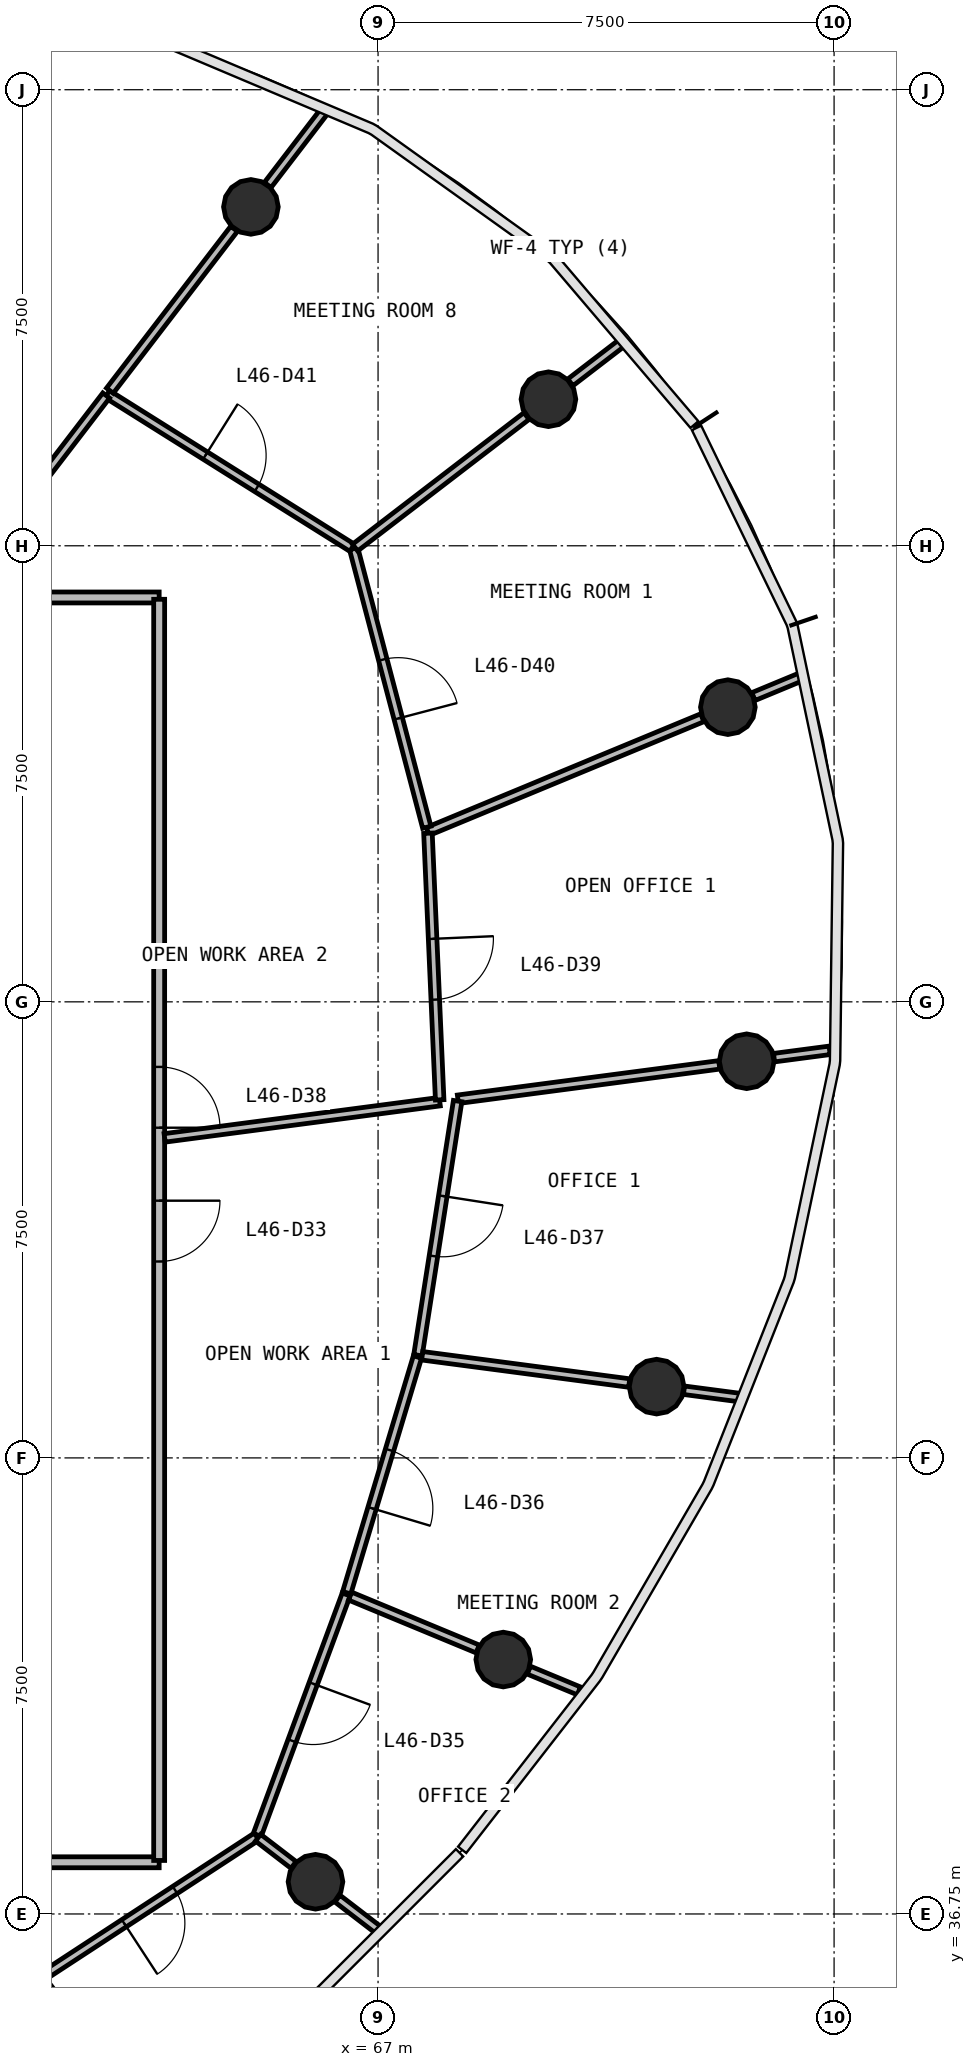
"""IFC4 building model, lengths in metres.
Left out: names, types, materials, properties, quantities, classifications, styles, units other than length and angle.
Written with IfcOpenShell. Run it as: python <this file> out.ifc"""

import sys

from ifc_helpers import new_model, si_unit, direction, frame, frame_2d, origin, origin_2d, place, context, subcontext, project, spatial, rectangle, circle, extrude, source, transform, mapped, element, fill, save


model = new_model("IFC4")
c1 = context("Model", 3, precision=1e-05, world=origin(), true_north=direction((0.0, 1.0)))
c2 = subcontext(c1, "Body", "Model", "MODEL_VIEW")
j1 = project(units=[si_unit("LENGTHUNIT", "METRE"), si_unit("PLANEANGLEUNIT", "RADIAN")], contexts=[c1])
p1 = place(None, origin())
s1 = spatial("IfcSite", under=j1, at=p1, CompositionType="ELEMENT")
p2 = place(p1, origin())
s2 = spatial("IfcBuilding", under=s1, at=p2, CompositionType="ELEMENT")
p3 = place(p2, frame((0.0, 0.0, 191.6)))
s3 = spatial("IfcBuildingStorey", under=s2, at=p3, CompositionType="ELEMENT", Elevation=191.6)
m1 = source(origin(), c2, "Body", "SweptSolid", [
    extrude(circle(Radius=0.45, at=origin_2d()), origin(), (0.0, 0.0, 1.0), 3.9),
])
for number, where, z_axis, x_axis in (
    (1, (73.062, 50.773, 0.0), (0.0, 0.0, 1.0), (1.0, 0.0, 0.0)),
    (2, (72.753, 56.596, 0.0), (0.0, 0.0, 1.0), (1.0, 0.0, 0.0)),
    (3, (69.802, 61.66, 0.0), (0.0, 0.0, 1.0), (1.0, 0.0, 0.0)),
    (4, (64.909, 64.823, 0.0), (0.0, 0.0, 1.0), (1.0, 0.0, 0.0)),
    (5, (65.971, 37.28, 0.0), (0.0, 0.0, 1.0), (1.0, 0.0, 0.0)),
    (6, (69.059, 40.934, 0.0), (0.0, 0.0, 1.0), (1.0, 0.0, 0.0)),
    (7, (71.581, 45.422, 0.0), (0.0, 0.0, 1.0), (1.0, 0.0, 0.0)),
):
    element("IfcColumn", number, at=place(p3, frame(where, z_axis=z_axis, x_axis=x_axis)), inside=s3, PredefinedType="COLUMN", context=c2, shape_type="MappedRepresentation", body=[
        mapped(m1, transform((0.0, 0.0, 0.0), scale=1.0)),
    ])
p4 = place(p3, frame((40.6, 58.4, 0.0), z_axis=(0.0, 0.0, 1.0), x_axis=(1.0, 0.0, 0.0)))
e8 = element("IfcWall", 8, at=p4, inside=s3, PredefinedType="PARTITIONING", context=c2, shape_type="SweptSolid", body=[
    extrude(rectangle(XDim=22.8, YDim=0.18, at=frame_2d((11.4, 0.0))), origin(), (0.0, 0.0, 1.0), 2.88),
])
p5 = place(p4, frame((12.95, 0.0, 0.0)))
e9 = element("IfcOpeningElement", 9, at=p5, cuts=e8, PredefinedType="OPENING", context=c2, shape_type="SweptSolid", body=[
    extrude(rectangle(XDim=1.0, YDim=2.1, at=frame_2d((0.5, 1.05))), frame((0.0, 0.1, 0.0), z_axis=(0.0, -1.0, 0.0), x_axis=(1.0, 0.0, 0.0)), (0.0, 0.0, 1.0), 0.2),
])
p6 = place(p4, frame((10.95, 0.0, 0.0)))
e10 = element("IfcOpeningElement", 10, at=p6, cuts=e8, PredefinedType="OPENING", context=c2, shape_type="SweptSolid", body=[
    extrude(rectangle(XDim=1.0, YDim=2.1, at=frame_2d((0.5, 1.05))), frame((0.0, 0.1, 0.0), z_axis=(0.0, -1.0, 0.0), x_axis=(1.0, 0.0, 0.0)), (0.0, 0.0, 1.0), 0.2),
])
p7 = place(p4, frame((5.75, 0.0, 0.0)))
e11 = element("IfcOpeningElement", 11, at=p7, cuts=e8, PredefinedType="OPENING", context=c2, shape_type="SweptSolid", body=[
    extrude(rectangle(XDim=1.0, YDim=2.1, at=frame_2d((0.5, 1.05))), frame((0.0, 0.1, 0.0), z_axis=(0.0, -1.0, 0.0), x_axis=(1.0, 0.0, 0.0)), (0.0, 0.0, 1.0), 0.2),
])
p8 = place(p3, frame((63.4, 37.6, 0.0), z_axis=(0.0, 0.0, 1.0), x_axis=(-1.0, 0.0, 0.0)))
e12 = element("IfcWall", 12, at=p8, inside=s3, PredefinedType="PARTITIONING", context=c2, shape_type="SweptSolid", body=[
    extrude(rectangle(XDim=22.8, YDim=0.18, at=frame_2d((11.4, 0.0))), origin(), (0.0, 0.0, 1.0), 2.88),
])
p9 = place(p8, frame((10.95, 0.0, 0.0)))
e13 = element("IfcOpeningElement", 13, at=p9, cuts=e12, PredefinedType="OPENING", context=c2, shape_type="SweptSolid", body=[
    extrude(rectangle(XDim=1.0, YDim=2.1, at=frame_2d((0.5, 1.05))), frame((0.0, 0.1, 0.0), z_axis=(0.0, -1.0, 0.0), x_axis=(1.0, 0.0, 0.0)), (0.0, 0.0, 1.0), 0.2),
])
p10 = place(p8, frame((8.75, 0.0, 0.0)))
e14 = element("IfcOpeningElement", 14, at=p10, cuts=e12, PredefinedType="OPENING", context=c2, shape_type="SweptSolid", body=[
    extrude(rectangle(XDim=1.0, YDim=2.1, at=frame_2d((0.5, 1.05))), frame((0.0, 0.1, 0.0), z_axis=(0.0, -1.0, 0.0), x_axis=(1.0, 0.0, 0.0)), (0.0, 0.0, 1.0), 0.2),
])
p11 = place(p3, frame((63.4, 58.37, 0.0), z_axis=(0.0, 0.0, 1.0), x_axis=(0.0, -1.0, 0.0)))
e15 = element("IfcWall", 15, at=p11, inside=s3, PredefinedType="PARTITIONING", context=c2, shape_type="SweptSolid", body=[
    extrude(rectangle(XDim=20.74, YDim=0.18, at=frame_2d((10.37, 0.0))), origin(), (0.0, 0.0, 1.0), 2.88),
])
p12 = place(p11, frame((9.89, 0.0, 0.0)))
e16 = element("IfcOpeningElement", 16, at=p12, cuts=e15, PredefinedType="OPENING", context=c2, shape_type="SweptSolid", body=[
    extrude(rectangle(XDim=1.0, YDim=2.1, at=frame_2d((0.5, 1.05))), frame((0.0, 0.1, 0.0), z_axis=(0.0, -1.0, 0.0), x_axis=(1.0, 0.0, 0.0)), (0.0, 0.0, 1.0), 0.2),
])
p13 = place(p11, frame((7.69, 0.0, 0.0)))
e17 = element("IfcOpeningElement", 17, at=p13, cuts=e15, PredefinedType="OPENING", context=c2, shape_type="SweptSolid", body=[
    extrude(rectangle(XDim=1.0, YDim=2.1, at=frame_2d((0.5, 1.05))), frame((0.0, 0.1, 0.0), z_axis=(0.0, -1.0, 0.0), x_axis=(1.0, 0.0, 0.0)), (0.0, 0.0, 1.0), 0.2),
])
p14 = place(p3, frame((67.82, 54.552, 0.0), z_axis=(0.0, 0.0, 1.0), x_axis=(0.923864546683, 0.382719609353, 0.0)))
e18 = element("IfcWall", 18, at=p14, inside=s3, PredefinedType="PARTITIONING", context=c2, shape_type="SweptSolid", body=[
    extrude(rectangle(XDim=4.885, YDim=0.14, at=frame_2d((2.442, 0.0))), origin(), (0.0, 0.0, 1.0), 2.88),
])
p15 = place(p3, frame((66.599, 59.202, 0.0), z_axis=(0.0, 0.0, 1.0), x_axis=(0.253980714002, -0.967209282893, 0.0)))
e19 = element("IfcWall", 19, at=p15, inside=s3, PredefinedType="PARTITIONING", context=c2, shape_type="SweptSolid", body=[
    extrude(rectangle(XDim=4.736, YDim=0.14, at=frame_2d((2.368, 0.0))), origin(), (0.0, 0.0, 1.0), 2.88),
])
p16 = place(p15, frame((1.886, 0.0, 0.0)))
e20 = element("IfcOpeningElement", 20, at=p16, cuts=e19, PredefinedType="OPENING", context=c2, shape_type="SweptSolid", body=[
    extrude(rectangle(XDim=1.0, YDim=2.1, at=frame_2d((0.5, 1.05))), frame((0.0, 0.08, 0.0), z_axis=(0.0, -1.0, 0.0), x_axis=(1.0, 0.0, 0.0)), (0.0, 0.0, 1.0), 0.16),
])
p17 = place(p3, frame((62.547, 61.745, 0.0), z_axis=(0.0, 0.0, 1.0), x_axis=(0.846992708554, -0.531604506806, 0.0)))
e21 = element("IfcWall", 21, at=p17, inside=s3, PredefinedType="PARTITIONING", context=c2, shape_type="SweptSolid", body=[
    extrude(rectangle(XDim=4.754, YDim=0.14, at=frame_2d((2.377, 0.0))), origin(), (0.0, 0.0, 1.0), 2.88),
])
p18 = place(p17, frame((1.904, 0.0, 0.0)))
e22 = element("IfcOpeningElement", 22, at=p18, cuts=e21, PredefinedType="OPENING", context=c2, shape_type="SweptSolid", body=[
    extrude(rectangle(XDim=1.0, YDim=2.1, at=frame_2d((0.5, 1.05))), frame((0.0, 0.08, 0.0), z_axis=(0.0, -1.0, 0.0), x_axis=(1.0, 0.0, 0.0)), (0.0, 0.0, 1.0), 0.16),
])
p19 = place(p3, frame((63.49, 49.513, 0.0), z_axis=(0.0, 0.0, 1.0), x_axis=(0.991445189432, 0.130523700346, 0.0)))
e23 = element("IfcWall", 23, at=p19, inside=s3, PredefinedType="PARTITIONING", context=c2, shape_type="SweptSolid", body=[
    extrude(rectangle(XDim=4.564, YDim=0.14, at=frame_2d((2.282, 0.0))), origin(), (0.0, 0.0, 1.0), 2.88),
])
p20 = place(p3, frame((67.821, 54.523, 0.0), z_axis=(0.0, 0.0, 1.0), x_axis=(0.043891066245, -0.999036322815, 0.0)))
e24 = element("IfcWall", 24, at=p20, inside=s3, PredefinedType="PARTITIONING", context=c2, shape_type="SweptSolid", body=[
    extrude(rectangle(XDim=4.389, YDim=0.14, at=frame_2d((2.194, 0.0))), origin(), (0.0, 0.0, 1.0), 2.88),
])
p21 = place(p20, frame((1.739, 0.0, 0.0)))
e25 = element("IfcOpeningElement", 25, at=p21, cuts=e24, PredefinedType="OPENING", context=c2, shape_type="SweptSolid", body=[
    extrude(rectangle(XDim=1.0, YDim=2.1, at=frame_2d((0.5, 1.05))), frame((0.0, 0.08, 0.0), z_axis=(0.0, -1.0, 0.0), x_axis=(1.0, 0.0, 0.0)), (0.0, 0.0, 1.0), 0.16),
])
p22 = place(p3, frame((68.313, 50.148, 0.0), z_axis=(0.0, 0.0, 1.0), x_axis=(0.991443942206, 0.130533173806, 0.0)))
e26 = element("IfcWall", 26, at=p22, inside=s3, PredefinedType="PARTITIONING", context=c2, shape_type="SweptSolid", body=[
    extrude(rectangle(XDim=4.335, YDim=0.14, at=frame_2d((2.168, 0.0))), origin(), (0.0, 0.0, 1.0), 2.88),
])
p23 = place(p3, frame((68.309, 50.118, 0.0), z_axis=(0.0, 0.0, 1.0), x_axis=(-0.154216660459, -0.988037054789, 0.0)))
e27 = element("IfcWall", 27, at=p23, inside=s3, PredefinedType="PARTITIONING", context=c2, shape_type="SweptSolid", body=[
    extrude(rectangle(XDim=4.23, YDim=0.14, at=frame_2d((2.115, 0.0))), origin(), (0.0, 0.0, 1.0), 2.88),
])
p24 = place(p23, frame((1.58, 0.0, 0.0)))
e28 = element("IfcOpeningElement", 28, at=p24, cuts=e27, PredefinedType="OPENING", context=c2, shape_type="SweptSolid", body=[
    extrude(rectangle(XDim=1.0, YDim=2.1, at=frame_2d((0.5, 1.05))), frame((0.0, 0.08, 0.0), z_axis=(0.0, -1.0, 0.0), x_axis=(1.0, 0.0, 0.0)), (0.0, 0.0, 1.0), 0.16),
])
p25 = place(p3, frame((65.003, 38.022, 0.0), z_axis=(0.0, 0.0, 1.0), x_axis=(-0.837161645349, -0.546955555376, 0.0)))
e29 = element("IfcWall", 29, at=p25, inside=s3, PredefinedType="PARTITIONING", context=c2, shape_type="SweptSolid", body=[
    extrude(rectangle(XDim=4.254, YDim=0.14, at=frame_2d((2.127, 0.0))), origin(), (0.0, 0.0, 1.0), 2.88),
])
p26 = place(p25, frame((1.604, 0.0, 0.0)))
e30 = element("IfcOpeningElement", 30, at=p26, cuts=e29, PredefinedType="OPENING", context=c2, shape_type="SweptSolid", body=[
    extrude(rectangle(XDim=1.0, YDim=2.1, at=frame_2d((0.5, 1.05))), frame((0.0, 0.08, 0.0), z_axis=(0.0, -1.0, 0.0), x_axis=(1.0, 0.0, 0.0)), (0.0, 0.0, 1.0), 0.16),
])
p27 = place(p3, frame((66.476, 42.004, 0.0), z_axis=(0.0, 0.0, 1.0), x_axis=(-0.346867255576, -0.937914232225, 0.0)))
e31 = element("IfcWall", 31, at=p27, inside=s3, PredefinedType="PARTITIONING", context=c2, shape_type="SweptSolid", body=[
    extrude(rectangle(XDim=4.215, YDim=0.14, at=frame_2d((2.108, 0.0))), origin(), (0.0, 0.0, 1.0), 2.88),
])
p28 = place(p27, frame((1.565, 0.0, 0.0)))
e32 = element("IfcOpeningElement", 32, at=p28, cuts=e31, PredefinedType="OPENING", context=c2, shape_type="SweptSolid", body=[
    extrude(rectangle(XDim=1.0, YDim=2.1, at=frame_2d((0.5, 1.05))), frame((0.0, 0.08, 0.0), z_axis=(0.0, -1.0, 0.0), x_axis=(1.0, 0.0, 0.0)), (0.0, 0.0, 1.0), 0.16),
])
p29 = place(p3, frame((60.049, 58.49, 0.0), z_axis=(0.0, 0.0, 1.0), x_axis=(0.608739821429, 0.793369919903, 0.0)))
e33 = element("IfcWall", 33, at=p29, inside=s3, PredefinedType="PARTITIONING", context=c2, shape_type="SweptSolid", body=[
    extrude(rectangle(XDim=4.073, YDim=0.14, at=frame_2d((2.036, 0.0))), origin(), (0.0, 0.0, 1.0), 2.88),
])
p30 = place(p3, frame((67.648, 45.91, 0.0), z_axis=(0.0, 0.0, 1.0), x_axis=(-0.28737001705, -0.957819645497, 0.0)))
e34 = element("IfcWall", 34, at=p30, inside=s3, PredefinedType="PARTITIONING", context=c2, shape_type="SweptSolid", body=[
    extrude(rectangle(XDim=4.048, YDim=0.14, at=frame_2d((2.024, 0.0))), origin(), (0.0, 0.0, 1.0), 2.88),
])
p31 = place(p30, frame((1.598, 0.0, 0.0)))
e35 = element("IfcOpeningElement", 35, at=p31, cuts=e34, PredefinedType="OPENING", context=c2, shape_type="SweptSolid", body=[
    extrude(rectangle(XDim=1.0, YDim=2.1, at=frame_2d((0.5, 1.05))), frame((0.0, 0.08, 0.0), z_axis=(0.0, -1.0, 0.0), x_axis=(1.0, 0.0, 0.0)), (0.0, 0.0, 1.0), 0.16),
])
p32 = place(p3, frame((66.622, 59.22, 0.0), z_axis=(0.0, 0.0, 1.0), x_axis=(0.793364115727, 0.60874738593, 0.0)))
e36 = element("IfcWall", 36, at=p32, inside=s3, PredefinedType="PARTITIONING", context=c2, shape_type="SweptSolid", body=[
    extrude(rectangle(XDim=3.553, YDim=0.14, at=frame_2d((1.777, 0.0))), origin(), (0.0, 0.0, 1.0), 2.88),
])
p33 = place(p3, frame((67.726, 45.93, 0.0), z_axis=(0.0, 0.0, 1.0), x_axis=(0.991443886809, -0.130533594563, 0.0)))
e37 = element("IfcWall", 37, at=p33, inside=s3, PredefinedType="PARTITIONING", context=c2, shape_type="SweptSolid", body=[
    extrude(rectangle(XDim=3.434, YDim=0.14, at=frame_2d((1.717, 0.0))), origin(), (0.0, 0.0, 1.0), 2.88),
])
p34 = place(p3, frame((62.59, 61.801, 0.0), z_axis=(0.0, 0.0, 1.0), x_axis=(0.608788963613, 0.793332211487, 0.0)))
e38 = element("IfcWall", 38, at=p34, inside=s3, PredefinedType="PARTITIONING", context=c2, shape_type="SweptSolid", body=[
    extrude(rectangle(XDim=3.355, YDim=0.14, at=frame_2d((1.677, 0.0))), origin(), (0.0, 0.0, 1.0), 2.88),
])
p35 = place(p3, frame((66.541, 41.977, 0.0), z_axis=(0.0, 0.0, 1.0), x_axis=(0.923885824628, -0.382668241498, 0.0)))
e39 = element("IfcWall", 39, at=p35, inside=s3, PredefinedType="PARTITIONING", context=c2, shape_type="SweptSolid", body=[
    extrude(rectangle(XDim=2.271, YDim=0.14, at=frame_2d((1.136, 0.0))), origin(), (0.0, 0.0, 1.0), 2.88),
])
p36 = place(p3, frame((65.186, 65.184, 0.0), z_axis=(0.0, 0.0, 1.0), x_axis=(0.608734333178, 0.793374130919, 0.0)))
e40 = element("IfcWall", 40, at=p36, inside=s3, PredefinedType="PARTITIONING", context=c2, shape_type="SweptSolid", body=[
    extrude(rectangle(XDim=1.523, YDim=0.14, at=frame_2d((0.762, 0.0))), origin(), (0.0, 0.0, 1.0), 2.88),
])
p37 = place(p3, frame((61.556, 35.546, 0.0), z_axis=(0.0, 0.0, 1.0), x_axis=(0.608740457709, -0.793369431695, 0.0)))
e41 = element("IfcWall", 41, at=p37, inside=s3, PredefinedType="PARTITIONING", context=c2, shape_type="SweptSolid", body=[
    extrude(rectangle(XDim=1.095, YDim=0.14, at=frame_2d((0.547, 0.0))), origin(), (0.0, 0.0, 1.0), 2.88),
])
p38 = place(p3, frame((70.163, 61.937, 0.0), z_axis=(0.0, 0.0, 1.0), x_axis=(0.793400806733, 0.608699564544, 0.0)))
e42 = element("IfcWall", 42, at=p38, inside=s3, PredefinedType="PARTITIONING", context=c2, shape_type="SweptSolid", body=[
    extrude(rectangle(XDim=1.109, YDim=0.14, at=frame_2d((0.554, 0.0))), origin(), (0.0, 0.0, 1.0), 2.88),
])
p39 = place(p3, frame((72.031, 45.363, 0.0), z_axis=(0.0, 0.0, 1.0), x_axis=(0.991456085685, -0.130440906764, 0.0)))
e43 = element("IfcWall", 43, at=p39, inside=s3, PredefinedType="PARTITIONING", context=c2, shape_type="SweptSolid", body=[
    extrude(rectangle(XDim=0.928, YDim=0.14, at=frame_2d((0.464, 0.0))), origin(), (0.0, 0.0, 1.0), 2.88),
])
p40 = place(p3, frame((73.513, 50.832, 0.0), z_axis=(0.0, 0.0, 1.0), x_axis=(0.991462412187, 0.130392811226, 0.0)))
e44 = element("IfcWall", 44, at=p40, inside=s3, PredefinedType="PARTITIONING", context=c2, shape_type="SweptSolid", body=[
    extrude(rectangle(XDim=0.921, YDim=0.14, at=frame_2d((0.46, 0.0))), origin(), (0.0, 0.0, 1.0), 2.88),
])
p41 = place(p3, frame((69.48, 40.76, 0.0), z_axis=(0.0, 0.0, 1.0), x_axis=(0.923869811138, -0.382706900994, 0.0)))
e45 = element("IfcWall", 45, at=p41, inside=s3, PredefinedType="PARTITIONING", context=c2, shape_type="SweptSolid", body=[
    extrude(rectangle(XDim=0.891, YDim=0.14, at=frame_2d((0.445, 0.0))), origin(), (0.0, 0.0, 1.0), 2.88),
])
p42 = place(p3, frame((73.174, 56.77, 0.0), z_axis=(0.0, 0.0, 1.0), x_axis=(0.923855963606, 0.38274032778, 0.0)))
e46 = element("IfcWall", 46, at=p42, inside=s3, PredefinedType="PARTITIONING", context=c2, shape_type="SweptSolid", body=[
    extrude(rectangle(XDim=0.851, YDim=0.14, at=frame_2d((0.425, 0.0))), origin(), (0.0, 0.0, 1.0), 2.88),
])
p43 = place(p3, frame((66.332, 37.003, 0.0), z_axis=(0.0, 0.0, 1.0), x_axis=(0.793390985662, -0.608712365466, 0.0)))
e47 = element("IfcWall", 47, at=p43, inside=s3, PredefinedType="PARTITIONING", context=c2, shape_type="SweptSolid", body=[
    extrude(rectangle(XDim=0.839, YDim=0.14, at=frame_2d((0.42, 0.0))), origin(), (0.0, 0.0, 1.0), 2.88),
])
p44 = place(p3, frame((65.027, 38.004, 0.0), z_axis=(0.0, 0.0, 1.0), x_axis=(0.793339152382, -0.608779918606, 0.0)))
e48 = element("IfcWall", 48, at=p44, inside=s3, PredefinedType="PARTITIONING", context=c2, shape_type="SweptSolid", body=[
    extrude(rectangle(XDim=0.736, YDim=0.14, at=frame_2d((0.368, 0.0))), origin(), (0.0, 0.0, 1.0), 2.88),
])
m2 = source(origin(), c2, "Body", "SweptSolid", [
    extrude(rectangle(XDim=1.0, YDim=2.1, at=frame_2d((0.5, 1.05))), frame((0.0, 0.025, 0.0), z_axis=(0.0, -1.0, 0.0), x_axis=(1.0, 0.0, 0.0)), (0.0, 0.0, 1.0), 0.05),
])
p45 = place(p12, origin())
e49 = element("IfcDoor", 49, at=p45, inside=s3, OperationType="SINGLE_SWING_LEFT", PredefinedType="DOOR", context=c2, shape_type="MappedRepresentation", body=[
    mapped(m2, transform((0.0, 0.0, 0.0), scale=1.0)),
])
fill(e16, e49)
p46 = place(p26, origin())
e50 = element("IfcDoor", 50, at=p46, inside=s3, OperationType="SINGLE_SWING_RIGHT", PredefinedType="DOOR", context=c2, shape_type="MappedRepresentation", body=[
    mapped(m2, transform((0.0, 0.0, 0.0), scale=1.0)),
])
fill(e30, e50)
p47 = place(p28, origin())
e51 = element("IfcDoor", 51, at=p47, inside=s3, OperationType="SINGLE_SWING_LEFT", PredefinedType="DOOR", context=c2, shape_type="MappedRepresentation", body=[
    mapped(m2, transform((0.0, 0.0, 0.0), scale=1.0)),
])
fill(e32, e51)
p48 = place(p31, origin())
e52 = element("IfcDoor", 52, at=p48, inside=s3, OperationType="SINGLE_SWING_RIGHT", PredefinedType="DOOR", context=c2, shape_type="MappedRepresentation", body=[
    mapped(m2, transform((0.0, 0.0, 0.0), scale=1.0)),
])
fill(e35, e52)
p49 = place(p24, origin())
e53 = element("IfcDoor", 53, at=p49, inside=s3, OperationType="SINGLE_SWING_LEFT", PredefinedType="DOOR", context=c2, shape_type="MappedRepresentation", body=[
    mapped(m2, transform((0.0, 0.0, 0.0), scale=1.0)),
])
fill(e28, e53)
p50 = place(p13, origin())
e54 = element("IfcDoor", 54, at=p50, inside=s3, OperationType="SINGLE_SWING_RIGHT", PredefinedType="DOOR", context=c2, shape_type="MappedRepresentation", body=[
    mapped(m2, transform((0.0, 0.0, 0.0), scale=1.0)),
])
fill(e17, e54)
p51 = place(p21, origin())
e55 = element("IfcDoor", 55, at=p51, inside=s3, OperationType="SINGLE_SWING_LEFT", PredefinedType="DOOR", context=c2, shape_type="MappedRepresentation", body=[
    mapped(m2, transform((0.0, 0.0, 0.0), scale=1.0)),
])
fill(e25, e55)
p52 = place(p16, origin())
e56 = element("IfcDoor", 56, at=p52, inside=s3, OperationType="SINGLE_SWING_RIGHT", PredefinedType="DOOR", context=c2, shape_type="MappedRepresentation", body=[
    mapped(m2, transform((0.0, 0.0, 0.0), scale=1.0)),
])
fill(e20, e56)
p53 = place(p18, origin())
e57 = element("IfcDoor", 57, at=p53, inside=s3, OperationType="SINGLE_SWING_LEFT", PredefinedType="DOOR", context=c2, shape_type="MappedRepresentation", body=[
    mapped(m2, transform((0.0, 0.0, 0.0), scale=1.0)),
])
fill(e22, e57)
save(model, sys.argv[1])
